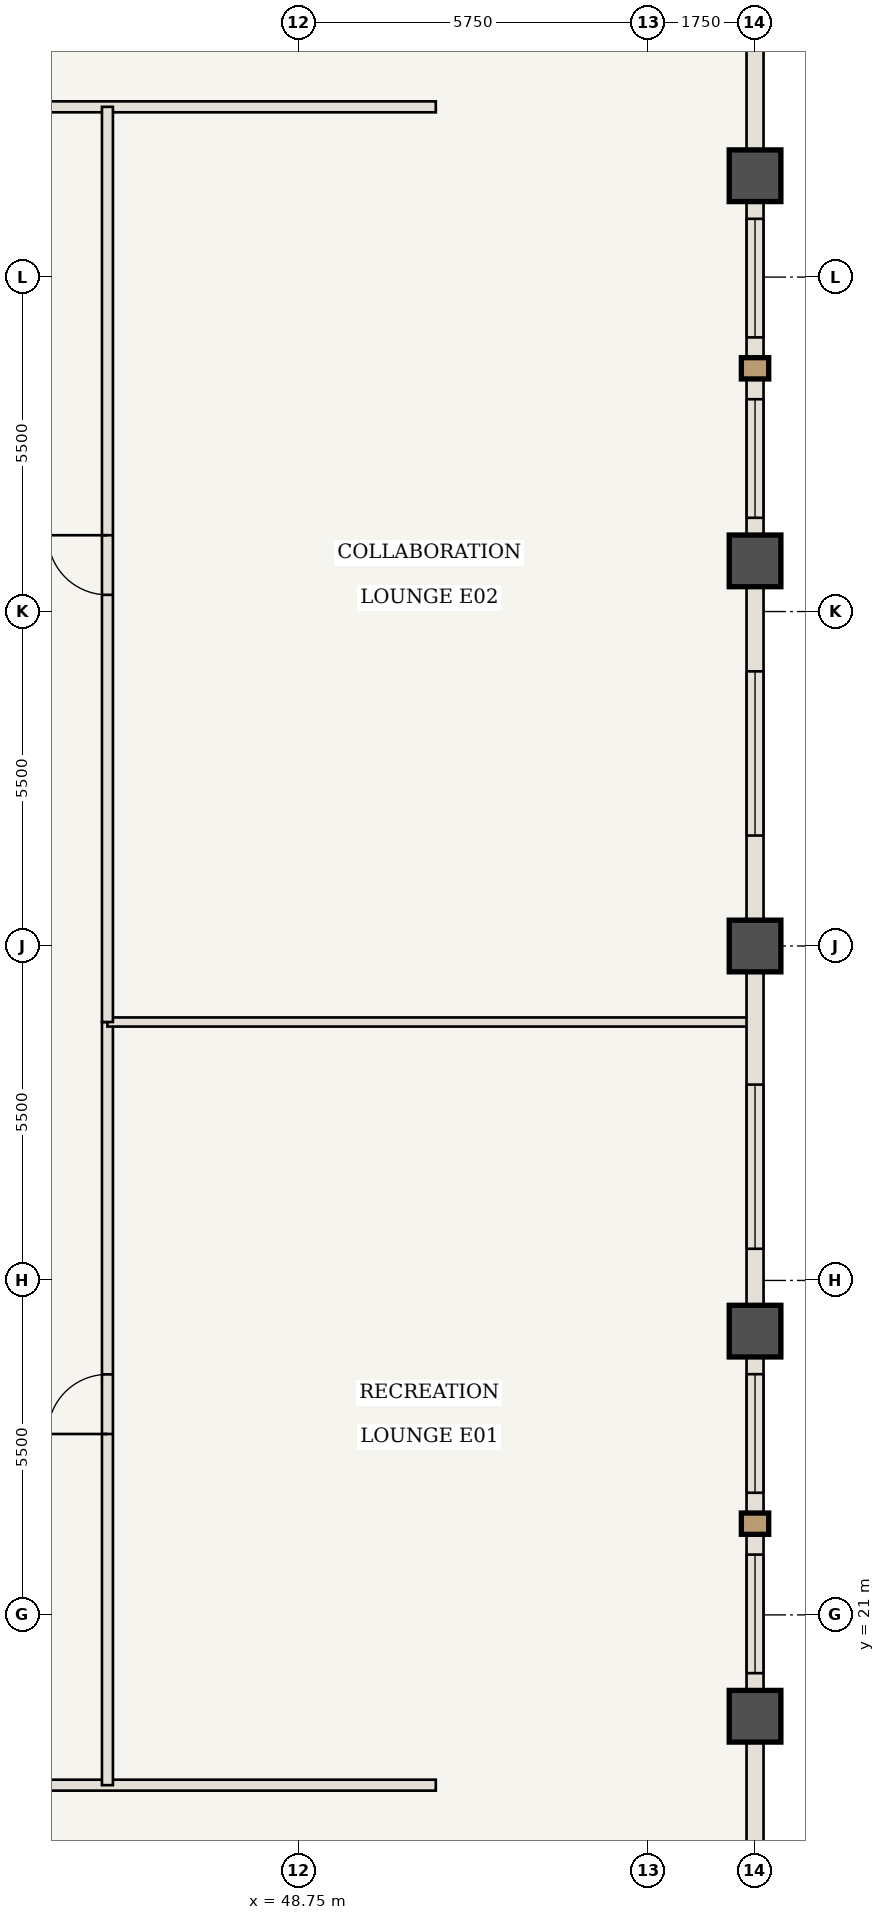
"""IFC4 building model, lengths in metres.
Left out: names, types, materials, properties, quantities, classifications, styles, units other than length and angle.
Written with IfcOpenShell. Run it as: python <this file> out.ifc"""

import sys

from ifc_helpers import new_model, si_unit, direction, frame, frame_2d, origin, origin_2d, place, context, subcontext, project, spatial, rectangle, extrude, element, fill, save


model = new_model("IFC4")
c1 = context("Model", 3, precision=1e-05, world=origin(), true_north=direction((0.0, 1.0)))
c2 = subcontext(c1, "Body", "Model", "MODEL_VIEW")
j1 = project(units=[si_unit("LENGTHUNIT", "METRE"), si_unit("PLANEANGLEUNIT", "RADIAN")], contexts=[c1])
p1 = place(None, origin())
s1 = spatial("IfcSite", under=j1, at=p1, CompositionType="ELEMENT")
p2 = place(p1, origin())
s2 = spatial("IfcBuilding", under=s1, at=p2, CompositionType="ELEMENT")
p3 = place(p2, frame((0.0, 0.0, 248.5)))
s3 = spatial("IfcBuildingStorey", under=s2, at=p3, CompositionType="ELEMENT", Elevation=248.5)
for number, where, z_axis, x_axis in (
    (1, (56.25, 19.333, 0.0), (0.0, 0.0, 1.0), (1.0, 0.0, 0.0)),
    (2, (56.25, 25.667, 0.0), (0.0, 0.0, 1.0), (1.0, 0.0, 0.0)),
    (3, (56.25, 32.0, 0.0), (0.0, 0.0, 1.0), (1.0, 0.0, 0.0)),
    (4, (56.25, 38.333, 0.0), (0.0, 0.0, 1.0), (1.0, 0.0, 0.0)),
    (5, (56.25, 44.667, 0.0), (0.0, 0.0, 1.0), (1.0, 0.0, 0.0)),
):
    element("IfcColumn", number, at=place(p3, frame(where, z_axis=z_axis, x_axis=x_axis)), inside=s3, PredefinedType="COLUMN", context=c2, shape_type="SweptSolid", body=[
        extrude(rectangle(XDim=0.85, YDim=0.85, at=origin_2d()), origin(), (0.0, 0.0, 1.0), 3.85),
    ])
p4 = place(p3, frame((13.0, 18.2, 0.0), z_axis=(0.0, 0.0, 1.0), x_axis=(1.0, 0.0, 0.0)))
e6 = element("IfcWall", 6, at=p4, inside=s3, PredefinedType="STANDARD", context=c2, shape_type="SweptSolid", body=[
    extrude(rectangle(XDim=38.0, YDim=0.18, at=frame_2d((19.0, 0.0))), origin(), (0.0, 0.0, 1.0), 3.43),
])
p5 = place(p4, frame((19.825, 0.0, 0.0)))
e7 = element("IfcOpeningElement", 7, at=p5, cuts=e6, PredefinedType="OPENING", context=c2, shape_type="SweptSolid", body=[
    extrude(rectangle(XDim=0.98, YDim=2.2, at=frame_2d((0.49, 1.1))), frame((0.0, 0.1, 0.0), z_axis=(0.0, -1.0, 0.0), x_axis=(1.0, 0.0, 0.0)), (0.0, 0.0, 1.0), 0.2),
])
p6 = place(p3, frame((39.558, 45.8, 0.0), z_axis=(0.0, 0.0, 1.0), x_axis=(1.0, 0.0, 0.0)))
e8 = element("IfcWall", 8, at=p6, inside=s3, PredefinedType="STANDARD", context=c2, shape_type="SweptSolid", body=[
    extrude(rectangle(XDim=11.442, YDim=0.18, at=frame_2d((5.721, 0.0))), origin(), (0.0, 0.0, 1.0), 3.43),
])
p7 = place(p6, frame((1.046, 0.0, 0.0)))
e9 = element("IfcOpeningElement", 9, at=p7, cuts=e8, PredefinedType="OPENING", context=c2, shape_type="SweptSolid", body=[
    extrude(rectangle(XDim=0.98, YDim=2.2, at=frame_2d((0.49, 1.1))), frame((0.0, 0.1, 0.0), z_axis=(0.0, -1.0, 0.0), x_axis=(1.0, 0.0, 0.0)), (0.0, 0.0, 1.0), 0.2),
])
p8 = place(p3, frame((45.6, 18.2, 0.0), z_axis=(0.0, 0.0, 1.0), x_axis=(0.0, 1.0, 0.0)))
e10 = element("IfcWall", 10, at=p8, inside=s3, PredefinedType="STANDARD", context=c2, shape_type="SweptSolid", body=[
    extrude(rectangle(XDim=12.55, YDim=0.18, at=frame_2d((6.275, 0.0))), origin(), (0.0, 0.0, 1.0), 3.43),
])
p9 = place(p8, frame((5.775, 0.0, 0.0)))
e11 = element("IfcOpeningElement", 11, at=p9, cuts=e10, PredefinedType="OPENING", context=c2, shape_type="SweptSolid", body=[
    extrude(rectangle(XDim=0.98, YDim=2.2, at=frame_2d((0.49, 1.1))), frame((0.0, 0.1, 0.0), z_axis=(0.0, -1.0, 0.0), x_axis=(1.0, 0.0, 0.0)), (0.0, 0.0, 1.0), 0.2),
])
p10 = place(p3, frame((45.6, 30.75, 0.0), z_axis=(0.0, 0.0, 1.0), x_axis=(1.0, 0.0, 0.0)))
e12 = element("IfcWall", 12, at=p10, inside=s3, PredefinedType="STANDARD", context=c2, shape_type="SweptSolid", body=[
    extrude(rectangle(XDim=10.59, YDim=0.15, at=frame_2d((5.295, 0.0))), origin(), (0.0, 0.0, 1.0), 3.43),
])
p11 = place(p3, frame((45.6, 30.75, 0.0), z_axis=(0.0, 0.0, 1.0), x_axis=(0.0, 1.0, 0.0)))
e13 = element("IfcWall", 13, at=p11, inside=s3, PredefinedType="STANDARD", context=c2, shape_type="SweptSolid", body=[
    extrude(rectangle(XDim=15.05, YDim=0.18, at=frame_2d((7.525, 0.0))), origin(), (0.0, 0.0, 1.0), 3.43),
])
p12 = place(p11, frame((7.025, 0.0, 0.0)))
e14 = element("IfcOpeningElement", 14, at=p12, cuts=e13, PredefinedType="OPENING", context=c2, shape_type="SweptSolid", body=[
    extrude(rectangle(XDim=0.98, YDim=2.2, at=frame_2d((0.49, 1.1))), frame((0.0, 0.1, 0.0), z_axis=(0.0, -1.0, 0.0), x_axis=(1.0, 0.0, 0.0)), (0.0, 0.0, 1.0), 0.2),
])
p13 = place(p3, frame((56.25, 19.333, 0.0), z_axis=(0.0, 0.0, 1.0), x_axis=(0.0, -1.0, 0.0)))
e15 = element("IfcWall", 15, at=p13, inside=s3, PredefinedType="USERDEFINED", context=c2, shape_type="SweptSolid", body=[
    extrude(rectangle(XDim=6.333, YDim=0.28, at=frame_2d((3.167, 0.0))), origin(), (0.0, 0.0, 1.0), 2.73),
])
p14 = place(p3, frame((56.25, 25.667, 0.0), z_axis=(0.0, 0.0, 1.0), x_axis=(0.0, -1.0, 0.0)))
e16 = element("IfcWall", 16, at=p14, inside=s3, PredefinedType="USERDEFINED", context=c2, shape_type="SweptSolid", body=[
    extrude(rectangle(XDim=6.333, YDim=0.28, at=frame_2d((3.167, 0.0))), origin(), (0.0, 0.0, 1.0), 2.73),
])
p15 = place(p14, frame((0.708, 0.0, 0.85)))
e17 = element("IfcOpeningElement", 17, at=p15, cuts=e16, PredefinedType="OPENING", context=c2, shape_type="SweptSolid", body=[
    extrude(rectangle(XDim=1.95, YDim=1.68, at=frame_2d((0.975, 0.84))), frame((0.0, 0.15, 0.0), z_axis=(0.0, -1.0, 0.0), x_axis=(1.0, 0.0, 0.0)), (0.0, 0.0, 1.0), 0.3),
])
p16 = place(p14, frame((3.675, 0.0, 0.85)))
e18 = element("IfcOpeningElement", 18, at=p16, cuts=e16, PredefinedType="OPENING", context=c2, shape_type="SweptSolid", body=[
    extrude(rectangle(XDim=1.95, YDim=1.68, at=frame_2d((0.975, 0.84))), frame((0.0, 0.15, 0.0), z_axis=(0.0, -1.0, 0.0), x_axis=(1.0, 0.0, 0.0)), (0.0, 0.0, 1.0), 0.3),
])
p17 = place(p3, frame((56.25, 32.0, 0.0), z_axis=(0.0, 0.0, 1.0), x_axis=(0.0, -1.0, 0.0)))
e19 = element("IfcWall", 19, at=p17, inside=s3, PredefinedType="USERDEFINED", context=c2, shape_type="SweptSolid", body=[
    extrude(rectangle(XDim=6.333, YDim=0.28, at=frame_2d((3.167, 0.0))), origin(), (0.0, 0.0, 1.0), 2.73),
])
p18 = place(p17, frame((2.279, 0.0, 0.85)))
e20 = element("IfcOpeningElement", 20, at=p18, cuts=e19, PredefinedType="OPENING", context=c2, shape_type="SweptSolid", body=[
    extrude(rectangle(XDim=2.7, YDim=1.68, at=frame_2d((1.35, 0.84))), frame((0.0, 0.15, 0.0), z_axis=(0.0, -1.0, 0.0), x_axis=(1.0, 0.0, 0.0)), (0.0, 0.0, 1.0), 0.3),
])
p19 = place(p3, frame((56.25, 38.333, 0.0), z_axis=(0.0, 0.0, 1.0), x_axis=(0.0, -1.0, 0.0)))
e21 = element("IfcWall", 21, at=p19, inside=s3, PredefinedType="USERDEFINED", context=c2, shape_type="SweptSolid", body=[
    extrude(rectangle(XDim=6.333, YDim=0.28, at=frame_2d((3.167, 0.0))), origin(), (0.0, 0.0, 1.0), 2.73),
])
p20 = place(p19, frame((1.817, 0.0, 0.85)))
e22 = element("IfcOpeningElement", 22, at=p20, cuts=e21, PredefinedType="OPENING", context=c2, shape_type="SweptSolid", body=[
    extrude(rectangle(XDim=2.7, YDim=1.68, at=frame_2d((1.35, 0.84))), frame((0.0, 0.15, 0.0), z_axis=(0.0, -1.0, 0.0), x_axis=(1.0, 0.0, 0.0)), (0.0, 0.0, 1.0), 0.3),
])
p21 = place(p3, frame((56.25, 44.667, 0.0), z_axis=(0.0, 0.0, 1.0), x_axis=(0.0, -1.0, 0.0)))
e23 = element("IfcWall", 23, at=p21, inside=s3, PredefinedType="USERDEFINED", context=c2, shape_type="SweptSolid", body=[
    extrude(rectangle(XDim=6.333, YDim=0.28, at=frame_2d((3.167, 0.0))), origin(), (0.0, 0.0, 1.0), 2.73),
])
p22 = place(p21, frame((0.708, 0.0, 0.85)))
e24 = element("IfcOpeningElement", 24, at=p22, cuts=e23, PredefinedType="OPENING", context=c2, shape_type="SweptSolid", body=[
    extrude(rectangle(XDim=1.95, YDim=1.68, at=frame_2d((0.975, 0.84))), frame((0.0, 0.15, 0.0), z_axis=(0.0, -1.0, 0.0), x_axis=(1.0, 0.0, 0.0)), (0.0, 0.0, 1.0), 0.3),
])
p23 = place(p21, frame((3.675, 0.0, 0.85)))
e25 = element("IfcOpeningElement", 25, at=p23, cuts=e23, PredefinedType="OPENING", context=c2, shape_type="SweptSolid", body=[
    extrude(rectangle(XDim=1.95, YDim=1.68, at=frame_2d((0.975, 0.84))), frame((0.0, 0.15, 0.0), z_axis=(0.0, -1.0, 0.0), x_axis=(1.0, 0.0, 0.0)), (0.0, 0.0, 1.0), 0.3),
])
p24 = place(p3, frame((56.25, 51.0, 0.0), z_axis=(0.0, 0.0, 1.0), x_axis=(0.0, -1.0, 0.0)))
e26 = element("IfcWall", 26, at=p24, inside=s3, PredefinedType="USERDEFINED", context=c2, shape_type="SweptSolid", body=[
    extrude(rectangle(XDim=6.333, YDim=0.28, at=frame_2d((3.167, 0.0))), origin(), (0.0, 0.0, 1.0), 2.73),
])
p25 = place(p9, origin())
e27 = element("IfcDoor", 27, at=p25, inside=s3, OperationType="SINGLE_SWING_LEFT", PredefinedType="DOOR", context=c2, shape_type="SweptSolid", body=[
    extrude(rectangle(XDim=0.98, YDim=2.2, at=frame_2d((0.49, 1.1))), frame((0.0, 0.025, 0.0), z_axis=(0.0, -1.0, 0.0), x_axis=(1.0, 0.0, 0.0)), (0.0, 0.0, 1.0), 0.05),
])
fill(e11, e27)
p26 = place(p12, origin())
e28 = element("IfcDoor", 28, at=p26, inside=s3, OperationType="SINGLE_SWING_RIGHT", PredefinedType="DOOR", context=c2, shape_type="SweptSolid", body=[
    extrude(rectangle(XDim=0.98, YDim=2.2, at=frame_2d((0.49, 1.1))), frame((0.0, 0.025, 0.0), z_axis=(0.0, -1.0, 0.0), x_axis=(1.0, 0.0, 0.0)), (0.0, 0.0, 1.0), 0.05),
])
fill(e14, e28)
p27 = place(p15, origin())
e29 = element("IfcWindow", 29, at=p27, inside=s3, PartitioningType="SINGLE_PANEL", PredefinedType="WINDOW", context=c2, shape_type="SweptSolid", body=[
    extrude(rectangle(XDim=1.95, YDim=1.68, at=frame_2d((0.975, 0.84))), frame((0.0, 0.03, 0.0), z_axis=(0.0, -1.0, 0.0), x_axis=(1.0, 0.0, 0.0)), (0.0, 0.0, 1.0), 0.06),
])
fill(e17, e29)
p28 = place(p16, origin())
e30 = element("IfcWindow", 30, at=p28, inside=s3, PartitioningType="SINGLE_PANEL", PredefinedType="WINDOW", context=c2, shape_type="SweptSolid", body=[
    extrude(rectangle(XDim=1.95, YDim=1.68, at=frame_2d((0.975, 0.84))), frame((0.0, 0.03, 0.0), z_axis=(0.0, -1.0, 0.0), x_axis=(1.0, 0.0, 0.0)), (0.0, 0.0, 1.0), 0.06),
])
fill(e18, e30)
p29 = place(p18, origin())
e31 = element("IfcWindow", 31, at=p29, inside=s3, PartitioningType="SINGLE_PANEL", PredefinedType="WINDOW", context=c2, shape_type="SweptSolid", body=[
    extrude(rectangle(XDim=2.7, YDim=1.68, at=frame_2d((1.35, 0.84))), frame((0.0, 0.03, 0.0), z_axis=(0.0, -1.0, 0.0), x_axis=(1.0, 0.0, 0.0)), (0.0, 0.0, 1.0), 0.06),
])
fill(e20, e31)
p30 = place(p20, origin())
e32 = element("IfcWindow", 32, at=p30, inside=s3, PartitioningType="SINGLE_PANEL", PredefinedType="WINDOW", context=c2, shape_type="SweptSolid", body=[
    extrude(rectangle(XDim=2.7, YDim=1.68, at=frame_2d((1.35, 0.84))), frame((0.0, 0.03, 0.0), z_axis=(0.0, -1.0, 0.0), x_axis=(1.0, 0.0, 0.0)), (0.0, 0.0, 1.0), 0.06),
])
fill(e22, e32)
p31 = place(p22, origin())
e33 = element("IfcWindow", 33, at=p31, inside=s3, PartitioningType="SINGLE_PANEL", PredefinedType="WINDOW", context=c2, shape_type="SweptSolid", body=[
    extrude(rectangle(XDim=1.95, YDim=1.68, at=frame_2d((0.975, 0.84))), frame((0.0, 0.03, 0.0), z_axis=(0.0, -1.0, 0.0), x_axis=(1.0, 0.0, 0.0)), (0.0, 0.0, 1.0), 0.06),
])
fill(e24, e33)
p32 = place(p23, origin())
e34 = element("IfcWindow", 34, at=p32, inside=s3, PartitioningType="SINGLE_PANEL", PredefinedType="WINDOW", context=c2, shape_type="SweptSolid", body=[
    extrude(rectangle(XDim=1.95, YDim=1.68, at=frame_2d((0.975, 0.84))), frame((0.0, 0.03, 0.0), z_axis=(0.0, -1.0, 0.0), x_axis=(1.0, 0.0, 0.0)), (0.0, 0.0, 1.0), 0.06),
])
fill(e25, e34)
save(model, sys.argv[1])
